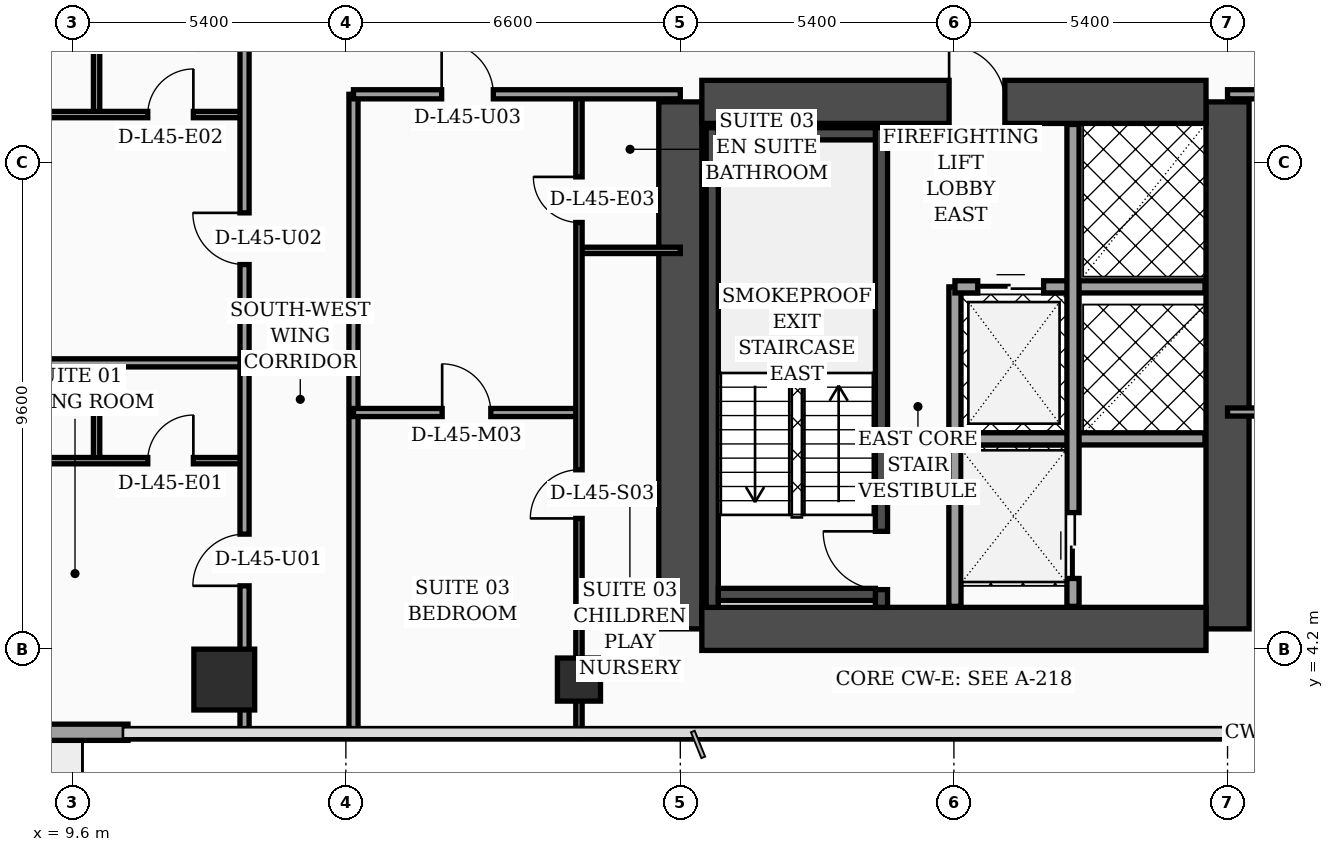
"""IFC4 building model, lengths in metres.
Left out: names, types, materials, properties, quantities, classifications, styles, units other than length and angle.
Written with IfcOpenShell. Run it as: python <this file> out.ifc"""

import sys

from ifc_helpers import new_model, si_unit, direction, frame, frame_2d, origin, origin_2d, place, context, subcontext, project, spatial, rectangle, hollow_rectangle, extrude, element, fill, save


model = new_model("IFC4")
c1 = context("Model", 3, precision=1e-05, world=origin(), true_north=direction((0.0, 1.0)))
c2 = subcontext(c1, "Body", "Model", "MODEL_VIEW")
j1 = project(units=[si_unit("LENGTHUNIT", "METRE"), si_unit("PLANEANGLEUNIT", "RADIAN")], contexts=[c1])
p1 = place(None, origin())
s1 = spatial("IfcSite", under=j1, at=p1, CompositionType="ELEMENT")
p2 = place(p1, origin())
s2 = spatial("IfcBuilding", under=s1, at=p2, CompositionType="ELEMENT")
p3 = place(p2, frame((0.0, 0.0, 182.7)))
s3 = spatial("IfcBuildingStorey", under=s2, at=p3, CompositionType="ELEMENT", Elevation=182.7)
for number, where, z_axis, x_axis in (
    (1, (21.6, 4.6, 0.0), (0.0, 0.0, 1.0), (0.0, 1.0, 0.0)),
    (2, (32.4, 4.6, 0.0), (0.0, 0.0, 1.0), (0.0, 1.0, 0.0)),
):
    element("IfcWall", number, at=place(p3, frame(where, z_axis=z_axis, x_axis=x_axis)), inside=s3, PredefinedType="SHEAR", context=c2, shape_type="SweptSolid", body=[
        extrude(rectangle(XDim=10.4, YDim=0.85, at=frame_2d((5.2, 0.0))), origin(), (0.0, 0.0, 1.0), 3.52),
    ])
p4 = place(p3, frame((22.025, 15.0, 0.0), z_axis=(0.0, 0.0, 1.0), x_axis=(1.0, 0.0, 0.0)))
e3 = element("IfcWall", 3, at=p4, inside=s3, PredefinedType="SHEAR", context=c2, shape_type="SweptSolid", body=[
    extrude(rectangle(XDim=9.95, YDim=0.85, at=frame_2d((4.975, 0.0))), origin(), (0.0, 0.0, 1.0), 3.52),
])
p5 = place(p4, frame((4.88, 0.0, 0.0)))
e4 = element("IfcOpeningElement", 4, at=p5, cuts=e3, PredefinedType="OPENING", context=c2, shape_type="SweptSolid", body=[
    extrude(rectangle(XDim=1.1, YDim=2.2, at=frame_2d((0.55, 1.1))), frame((0.0, 0.435, 0.0), z_axis=(0.0, -1.0, 0.0), x_axis=(1.0, 0.0, 0.0)), (0.0, 0.0, 1.0), 0.87),
])
p6 = place(p3, frame((22.025, 4.6, 0.0), z_axis=(0.0, 0.0, 1.0), x_axis=(1.0, 0.0, 0.0)))
e5 = element("IfcWall", 5, at=p6, inside=s3, PredefinedType="SHEAR", context=c2, shape_type="SweptSolid", body=[
    extrude(rectangle(XDim=9.95, YDim=0.85, at=frame_2d((4.975, 0.0))), origin(), (0.0, 0.0, 1.0), 3.52),
])
p7 = place(p3, frame((22.23, 5.025, 0.0), z_axis=(0.0, 0.0, 1.0), x_axis=(0.0, 1.0, 0.0)))
e6 = element("IfcWall", 6, at=p7, inside=s3, PredefinedType="SOLIDWALL", context=c2, shape_type="SweptSolid", body=[
    extrude(rectangle(XDim=9.465, YDim=0.24, at=frame_2d((4.732, 0.0))), origin(), (0.0, 0.0, 1.0), 3.52),
])
p8 = place(p3, frame((25.57, 5.025, 0.0), z_axis=(0.0, 0.0, 1.0), x_axis=(0.0, 1.0, 0.0)))
e7 = element("IfcWall", 7, at=p8, inside=s3, PredefinedType="SOLIDWALL", context=c2, shape_type="SweptSolid", body=[
    extrude(rectangle(XDim=9.465, YDim=0.24, at=frame_2d((4.732, 0.0))), origin(), (0.0, 0.0, 1.0), 3.52),
])
p9 = place(p8, frame((0.35, 0.0, 0.0)))
e8 = element("IfcOpeningElement", 8, at=p9, cuts=e7, PredefinedType="OPENING", context=c2, shape_type="SweptSolid", body=[
    extrude(rectangle(XDim=1.15, YDim=2.2, at=frame_2d((0.575, 1.1))), frame((0.0, 0.13, 0.0), z_axis=(0.0, -1.0, 0.0), x_axis=(1.0, 0.0, 0.0)), (0.0, 0.0, 1.0), 0.26),
])
for number, where, z_axis, x_axis in (
    (9, (22.35, 5.28, 0.0), (0.0, 0.0, 1.0), (1.0, 0.0, 0.0)),
    (10, (22.35, 14.37, 0.0), (0.0, 0.0, 1.0), (1.0, 0.0, 0.0)),
):
    element("IfcWall", number, at=place(p3, frame(where, z_axis=z_axis, x_axis=x_axis)), inside=s3, PredefinedType="SOLIDWALL", context=c2, shape_type="SweptSolid", body=[
        extrude(rectangle(XDim=3.1, YDim=0.24, at=frame_2d((1.55, 0.0))), origin(), (0.0, 0.0, 1.0), 3.52),
    ])
p10 = place(p3, frame((12.6, 3.6, 0.0), z_axis=(0.0, 0.0, 1.0), x_axis=(1.0, 0.0, 0.0)))
e11 = element("IfcColumn", 11, at=p10, inside=s3, PredefinedType="COLUMN", context=c2, shape_type="SweptSolid", body=[
    extrude(rectangle(XDim=1.2, YDim=1.2, at=origin_2d()), origin(), (0.0, 0.0, 1.0), 3.52),
])
p11 = place(p3, frame((19.6, 3.6, 0.0), z_axis=(0.0, 0.0, 1.0), x_axis=(1.0, 0.0, 0.0)))
e12 = element("IfcColumn", 12, at=p11, inside=s3, PredefinedType="COLUMN", context=c2, shape_type="SweptSolid", body=[
    extrude(hollow_rectangle(XDim=0.85, YDim=0.85, WallThickness=0.036, at=origin_2d()), origin(), (0.0, 0.0, 1.0), 3.52),
])
p12 = place(p3, frame((3.1, 2.56, 0.0), z_axis=(0.0, 0.0, 1.0), x_axis=(1.0, 0.0, 0.0)))
e13 = element("IfcWall", 13, at=p12, inside=s3, PredefinedType="SOLIDWALL", context=c2, shape_type="SweptSolid", body=[
    extrude(rectangle(XDim=7.6, YDim=0.32, at=frame_2d((3.8, 0.0))), origin(), (0.0, 0.0, 1.0), 3.52),
])
p13 = place(p12, frame((0.45, 0.0, 0.75)))
e14 = element("IfcOpeningElement", 14, at=p13, cuts=e13, PredefinedType="OPENING", context=c2, shape_type="SweptSolid", body=[
    extrude(rectangle(XDim=1.0, YDim=1.6, at=frame_2d((0.5, 0.8))), frame((0.0, 0.17, 0.0), z_axis=(0.0, -1.0, 0.0), x_axis=(1.0, 0.0, 0.0)), (0.0, 0.0, 1.0), 0.34),
])
p14 = place(p12, frame((3.8, 0.0, 0.0)))
e15 = element("IfcOpeningElement", 15, at=p14, cuts=e13, PredefinedType="OPENING", context=c2, shape_type="SweptSolid", body=[
    extrude(rectangle(XDim=1.4, YDim=2.25, at=frame_2d((0.7, 1.125))), frame((0.0, 0.17, 0.0), z_axis=(0.0, -1.0, 0.0), x_axis=(1.0, 0.0, 0.0)), (0.0, 0.0, 1.0), 0.34),
])
p15 = place(p3, frame((27.02, 5.045, 0.0), z_axis=(0.0, 0.0, 1.0), x_axis=(0.0, 1.0, 0.0)))
e16 = element("IfcWall", 16, at=p15, inside=s3, PredefinedType="SOLIDWALL", context=c2, shape_type="SweptSolid", body=[
    extrude(rectangle(XDim=6.305, YDim=0.24, at=frame_2d((3.153, 0.0))), origin(), (0.0, 0.0, 1.0), 3.52),
])
p16 = place(p3, frame((27.02, 11.35, 0.0), z_axis=(0.0, 0.0, 1.0), x_axis=(1.0, 0.0, 0.0)))
e17 = element("IfcWall", 17, at=p16, inside=s3, PredefinedType="SOLIDWALL", context=c2, shape_type="SweptSolid", body=[
    extrude(rectangle(XDim=4.935, YDim=0.24, at=frame_2d((2.468, 0.0))), origin(), (0.0, 0.0, 1.0), 3.52),
])
p17 = place(p16, frame((0.45, 0.0, 0.0)))
e18 = element("IfcOpeningElement", 18, at=p17, cuts=e17, PredefinedType="OPENING", context=c2, shape_type="SweptSolid", body=[
    extrude(rectangle(XDim=1.3, YDim=2.35, at=frame_2d((0.65, 1.175))), frame((0.0, 0.13, 0.0), z_axis=(0.0, -1.0, 0.0), x_axis=(1.0, 0.0, 0.0)), (0.0, 0.0, 1.0), 0.26),
])
p18 = place(p3, frame((27.02, 8.35, 0.0), z_axis=(0.0, 0.0, 1.0), x_axis=(1.0, 0.0, 0.0)))
e19 = element("IfcWall", 19, at=p18, inside=s3, PredefinedType="SOLIDWALL", context=c2, shape_type="SweptSolid", body=[
    extrude(rectangle(XDim=4.935, YDim=0.24, at=frame_2d((2.468, 0.0))), origin(), (0.0, 0.0, 1.0), 3.52),
])
p19 = place(p3, frame((29.35, 5.045, 0.0), z_axis=(0.0, 0.0, 1.0), x_axis=(0.0, 1.0, 0.0)))
e20 = element("IfcWall", 20, at=p19, inside=s3, PredefinedType="SOLIDWALL", context=c2, shape_type="SweptSolid", body=[
    extrude(rectangle(XDim=9.51, YDim=0.24, at=frame_2d((4.755, 0.0))), origin(), (0.0, 0.0, 1.0), 3.52),
])
p20 = place(p19, frame((0.55, 0.0, 0.0)))
e21 = element("IfcOpeningElement", 21, at=p20, cuts=e20, PredefinedType="OPENING", context=c2, shape_type="SweptSolid", body=[
    extrude(rectangle(XDim=1.3, YDim=2.35, at=frame_2d((0.65, 1.175))), frame((0.0, 0.13, 0.0), z_axis=(0.0, -1.0, 0.0), x_axis=(1.0, 0.0, 0.0)), (0.0, 0.0, 1.0), 0.26),
])
p21 = place(p3, frame((10.08, 7.92, 0.0), z_axis=(0.0, 0.0, 1.0), x_axis=(0.0, 1.0, 0.0)))
e22 = element("IfcWall", 22, at=p21, inside=s3, PredefinedType="PARTITIONING", context=c2, shape_type="SweptSolid", body=[
    extrude(rectangle(XDim=1.93, YDim=0.125, at=frame_2d((0.965, 0.0))), origin(), (0.0, 0.0, 1.0), 3.52),
])
p22 = place(p3, frame((3.2, 7.92, 0.0), z_axis=(0.0, 0.0, 1.0), x_axis=(1.0, 0.0, 0.0)))
e23 = element("IfcWall", 23, at=p22, inside=s3, PredefinedType="PARTITIONING", context=c2, shape_type="SweptSolid", body=[
    extrude(rectangle(XDim=9.8, YDim=0.125, at=frame_2d((4.9, 0.0))), origin(), (0.0, 0.0, 1.0), 2.92),
])
p23 = place(p22, frame((3.32, 0.0, 0.0)))
e24 = element("IfcOpeningElement", 24, at=p23, cuts=e23, PredefinedType="OPENING", context=c2, shape_type="SweptSolid", body=[
    extrude(rectangle(XDim=0.96, YDim=2.2, at=frame_2d((0.48, 1.1))), frame((0.0, 0.073, 0.0), z_axis=(0.0, -1.0, 0.0), x_axis=(1.0, 0.0, 0.0)), (0.0, 0.0, 1.0), 0.145),
])
p24 = place(p22, frame((7.89, 0.0, 0.0)))
e25 = element("IfcOpeningElement", 25, at=p24, cuts=e23, PredefinedType="OPENING", context=c2, shape_type="SweptSolid", body=[
    extrude(rectangle(XDim=0.9, YDim=2.15, at=frame_2d((0.45, 1.075))), frame((0.0, 0.073, 0.0), z_axis=(0.0, -1.0, 0.0), x_axis=(1.0, 0.0, 0.0)), (0.0, 0.0, 1.0), 0.145),
])
p25 = place(p3, frame((10.08, 14.75, 0.0), z_axis=(0.0, 0.0, 1.0), x_axis=(0.0, 1.0, 0.0)))
e26 = element("IfcWall", 26, at=p25, inside=s3, PredefinedType="PARTITIONING", context=c2, shape_type="SweptSolid", body=[
    extrude(rectangle(XDim=2.05, YDim=0.125, at=frame_2d((1.025, 0.0))), origin(), (0.0, 0.0, 1.0), 3.52),
])
p26 = place(p3, frame((0.08, 14.75, 0.0), z_axis=(0.0, 0.0, 1.0), x_axis=(1.0, 0.0, 0.0)))
e27 = element("IfcWall", 27, at=p26, inside=s3, PredefinedType="PARTITIONING", context=c2, shape_type="SweptSolid", body=[
    extrude(rectangle(XDim=12.92, YDim=0.125, at=frame_2d((6.46, 0.0))), origin(), (0.0, 0.0, 1.0), 2.92),
])
p27 = place(p26, frame((4.52, 0.0, 0.0)))
e28 = element("IfcOpeningElement", 28, at=p27, cuts=e27, PredefinedType="OPENING", context=c2, shape_type="SweptSolid", body=[
    extrude(rectangle(XDim=0.96, YDim=2.2, at=frame_2d((0.48, 1.1))), frame((0.0, 0.073, 0.0), z_axis=(0.0, -1.0, 0.0), x_axis=(1.0, 0.0, 0.0)), (0.0, 0.0, 1.0), 0.145),
])
p28 = place(p26, frame((11.01, 0.0, 0.0)))
e29 = element("IfcOpeningElement", 29, at=p28, cuts=e27, PredefinedType="OPENING", context=c2, shape_type="SweptSolid", body=[
    extrude(rectangle(XDim=0.9, YDim=2.15, at=frame_2d((0.45, 1.075))), frame((0.0, 0.073, 0.0), z_axis=(0.0, -1.0, 0.0), x_axis=(1.0, 0.0, 0.0)), (0.0, 0.0, 1.0), 0.145),
])
p29 = place(p3, frame((0.08, 9.85, 0.0), z_axis=(0.0, 0.0, 1.0), x_axis=(1.0, 0.0, 0.0)))
e30 = element("IfcWall", 30, at=p29, inside=s3, PredefinedType="PARTITIONING", context=c2, shape_type="SweptSolid", body=[
    extrude(rectangle(XDim=12.92, YDim=0.16, at=frame_2d((6.46, 0.0))), origin(), (0.0, 0.0, 1.0), 2.92),
])
p30 = place(p3, frame((13.0, 2.44, 0.0), z_axis=(0.0, 0.0, 1.0), x_axis=(0.0, 1.0, 0.0)))
e31 = element("IfcWall", 31, at=p30, inside=s3, PredefinedType="PARTITIONING", context=c2, shape_type="SweptSolid", body=[
    extrude(rectangle(XDim=14.36, YDim=0.18, at=frame_2d((7.18, 0.0))), origin(), (0.0, 0.0, 1.0), 2.92),
])
p31 = place(p30, frame((3.01, 0.0, 0.0)))
e32 = element("IfcOpeningElement", 32, at=p31, cuts=e31, PredefinedType="OPENING", context=c2, shape_type="SweptSolid", body=[
    extrude(rectangle(XDim=1.02, YDim=2.2, at=frame_2d((0.51, 1.1))), frame((0.0, 0.1, 0.0), z_axis=(0.0, -1.0, 0.0), x_axis=(1.0, 0.0, 0.0)), (0.0, 0.0, 1.0), 0.2),
])
p32 = place(p30, frame((9.35, 0.0, 0.0)))
e33 = element("IfcOpeningElement", 33, at=p32, cuts=e31, PredefinedType="OPENING", context=c2, shape_type="SweptSolid", body=[
    extrude(rectangle(XDim=1.02, YDim=2.2, at=frame_2d((0.51, 1.1))), frame((0.0, 0.1, 0.0), z_axis=(0.0, -1.0, 0.0), x_axis=(1.0, 0.0, 0.0)), (0.0, 0.0, 1.0), 0.2),
])
p33 = place(p3, frame((15.15, 2.44, 0.0), z_axis=(0.0, 0.0, 1.0), x_axis=(0.0, 1.0, 0.0)))
e34 = element("IfcWall", 34, at=p33, inside=s3, PredefinedType="PARTITIONING", context=c2, shape_type="SweptSolid", body=[
    extrude(rectangle(XDim=12.71, YDim=0.18, at=frame_2d((6.355, 0.0))), origin(), (0.0, 0.0, 1.0), 3.02),
])
p34 = place(p3, frame((19.6, 12.07, 0.0), z_axis=(0.0, 0.0, 1.0), x_axis=(1.0, 0.0, 0.0)))
e35 = element("IfcWall", 35, at=p34, inside=s3, PredefinedType="PARTITIONING", context=c2, shape_type="SweptSolid", body=[
    extrude(rectangle(XDim=2.0, YDim=0.125, at=frame_2d((1.0, 0.0))), origin(), (0.0, 0.0, 1.0), 3.52),
])
p35 = place(p3, frame((15.15, 8.87, 0.0), z_axis=(0.0, 0.0, 1.0), x_axis=(1.0, 0.0, 0.0)))
e36 = element("IfcWall", 36, at=p35, inside=s3, PredefinedType="PARTITIONING", context=c2, shape_type="SweptSolid", body=[
    extrude(rectangle(XDim=4.45, YDim=0.16, at=frame_2d((2.225, 0.0))), origin(), (0.0, 0.0, 1.0), 3.52),
])
p36 = place(p35, frame((1.75, 0.0, 0.0)))
e37 = element("IfcOpeningElement", 37, at=p36, cuts=e36, PredefinedType="OPENING", context=c2, shape_type="SweptSolid", body=[
    extrude(rectangle(XDim=0.96, YDim=2.2, at=frame_2d((0.48, 1.1))), frame((0.0, 0.09, 0.0), z_axis=(0.0, -1.0, 0.0), x_axis=(1.0, 0.0, 0.0)), (0.0, 0.0, 1.0), 0.18),
])
p37 = place(p3, frame((19.6, 2.44, 0.0), z_axis=(0.0, 0.0, 1.0), x_axis=(0.0, 1.0, 0.0)))
e38 = element("IfcWall", 38, at=p37, inside=s3, PredefinedType="PARTITIONING", context=c2, shape_type="SweptSolid", body=[
    extrude(rectangle(XDim=12.71, YDim=0.125, at=frame_2d((6.355, 0.0))), origin(), (0.0, 0.0, 1.0), 2.47),
])
p38 = place(p37, frame((4.34, 0.0, 0.0)))
e39 = element("IfcOpeningElement", 39, at=p38, cuts=e38, PredefinedType="OPENING", context=c2, shape_type="SweptSolid", body=[
    extrude(rectangle(XDim=0.96, YDim=2.2, at=frame_2d((0.48, 1.1))), frame((0.0, 0.073, 0.0), z_axis=(0.0, -1.0, 0.0), x_axis=(1.0, 0.0, 0.0)), (0.0, 0.0, 1.0), 0.145),
])
p39 = place(p37, frame((10.18, 0.0, 0.0)))
e40 = element("IfcOpeningElement", 40, at=p39, cuts=e38, PredefinedType="OPENING", context=c2, shape_type="SweptSolid", body=[
    extrude(rectangle(XDim=0.9, YDim=2.15, at=frame_2d((0.45, 1.075))), frame((0.0, 0.073, 0.0), z_axis=(0.0, -1.0, 0.0), x_axis=(1.0, 0.0, 0.0)), (0.0, 0.0, 1.0), 0.145),
])
p40 = place(p3, frame((15.15, 15.15, 0.0), z_axis=(0.0, 0.0, 1.0), x_axis=(1.0, 0.0, 0.0)))
e41 = element("IfcWall", 41, at=p40, inside=s3, PredefinedType="PARTITIONING", context=c2, shape_type="SweptSolid", body=[
    extrude(rectangle(XDim=6.45, YDim=0.18, at=frame_2d((3.225, 0.0))), origin(), (0.0, 0.0, 1.0), 2.47),
])
p41 = place(p40, frame((1.74, 0.0, 0.0)))
e42 = element("IfcOpeningElement", 42, at=p41, cuts=e41, PredefinedType="OPENING", context=c2, shape_type="SweptSolid", body=[
    extrude(rectangle(XDim=1.02, YDim=2.2, at=frame_2d((0.51, 1.1))), frame((0.0, 0.1, 0.0), z_axis=(0.0, -1.0, 0.0), x_axis=(1.0, 0.0, 0.0)), (0.0, 0.0, 1.0), 0.2),
])
p42 = place(p3, frame((32.4, 8.88, 0.0), z_axis=(0.0, 0.0, 1.0), x_axis=(1.0, 0.0, 0.0)))
e43 = element("IfcWall", 43, at=p42, inside=s3, PredefinedType="PARTITIONING", context=c2, shape_type="SweptSolid", body=[
    extrude(rectangle(XDim=5.2, YDim=0.16, at=frame_2d((2.6, 0.0))), origin(), (0.0, 0.0, 1.0), 2.92),
])
p43 = place(p42, frame((2.12, 0.0, 0.0)))
e44 = element("IfcOpeningElement", 44, at=p43, cuts=e43, PredefinedType="OPENING", context=c2, shape_type="SweptSolid", body=[
    extrude(rectangle(XDim=0.96, YDim=2.2, at=frame_2d((0.48, 1.1))), frame((0.0, 0.09, 0.0), z_axis=(0.0, -1.0, 0.0), x_axis=(1.0, 0.0, 0.0)), (0.0, 0.0, 1.0), 0.18),
])
p44 = place(p3, frame((32.4, 15.15, 0.0), z_axis=(0.0, 0.0, 1.0), x_axis=(1.0, 0.0, 0.0)))
e45 = element("IfcWall", 45, at=p44, inside=s3, PredefinedType="PARTITIONING", context=c2, shape_type="SweptSolid", body=[
    extrude(rectangle(XDim=7.2, YDim=0.18, at=frame_2d((3.6, 0.0))), origin(), (0.0, 0.0, 1.0), 2.92),
])
p45 = place(p44, frame((2.19, 0.0, 0.0)))
e46 = element("IfcOpeningElement", 46, at=p45, cuts=e45, PredefinedType="OPENING", context=c2, shape_type="SweptSolid", body=[
    extrude(rectangle(XDim=1.02, YDim=2.2, at=frame_2d((0.51, 1.1))), frame((0.0, 0.1, 0.0), z_axis=(0.0, -1.0, 0.0), x_axis=(1.0, 0.0, 0.0)), (0.0, 0.0, 1.0), 0.2),
])
p46 = place(p17, origin())
e47 = element("IfcDoor", 47, at=p46, inside=s3, OperationType="DOUBLE_DOOR_SLIDING", PredefinedType="DOOR", context=c2, shape_type="SweptSolid", body=[
    extrude(rectangle(XDim=1.3, YDim=2.35, at=frame_2d((0.65, 1.175))), frame((0.0, 0.025, 0.0), z_axis=(0.0, -1.0, 0.0), x_axis=(1.0, 0.0, 0.0)), (0.0, 0.0, 1.0), 0.05),
])
fill(e18, e47)
p47 = place(p20, origin())
e48 = element("IfcDoor", 48, at=p47, inside=s3, OperationType="DOUBLE_DOOR_SLIDING", PredefinedType="DOOR", context=c2, shape_type="SweptSolid", body=[
    extrude(rectangle(XDim=1.3, YDim=2.35, at=frame_2d((0.65, 1.175))), frame((0.0, 0.025, 0.0), z_axis=(0.0, -1.0, 0.0), x_axis=(1.0, 0.0, 0.0)), (0.0, 0.0, 1.0), 0.05),
])
fill(e21, e48)
p48 = place(p24, origin())
e49 = element("IfcDoor", 49, at=p48, inside=s3, OperationType="SINGLE_SWING_RIGHT", PredefinedType="DOOR", context=c2, shape_type="SweptSolid", body=[
    extrude(rectangle(XDim=0.9, YDim=2.15, at=frame_2d((0.45, 1.075))), frame((0.0, 0.025, 0.0), z_axis=(0.0, -1.0, 0.0), x_axis=(1.0, 0.0, 0.0)), (0.0, 0.0, 1.0), 0.05),
])
fill(e25, e49)
p49 = place(p28, origin())
e50 = element("IfcDoor", 50, at=p49, inside=s3, OperationType="SINGLE_SWING_RIGHT", PredefinedType="DOOR", context=c2, shape_type="SweptSolid", body=[
    extrude(rectangle(XDim=0.9, YDim=2.15, at=frame_2d((0.45, 1.075))), frame((0.0, 0.025, 0.0), z_axis=(0.0, -1.0, 0.0), x_axis=(1.0, 0.0, 0.0)), (0.0, 0.0, 1.0), 0.05),
])
fill(e29, e50)
p50 = place(p31, origin())
e51 = element("IfcDoor", 51, at=p50, inside=s3, OperationType="SINGLE_SWING_LEFT", PredefinedType="DOOR", context=c2, shape_type="SweptSolid", body=[
    extrude(rectangle(XDim=1.02, YDim=2.2, at=frame_2d((0.51, 1.1))), frame((0.0, 0.025, 0.0), z_axis=(0.0, -1.0, 0.0), x_axis=(1.0, 0.0, 0.0)), (0.0, 0.0, 1.0), 0.05),
])
fill(e32, e51)
p51 = place(p32, origin())
e52 = element("IfcDoor", 52, at=p51, inside=s3, OperationType="SINGLE_SWING_RIGHT", PredefinedType="DOOR", context=c2, shape_type="SweptSolid", body=[
    extrude(rectangle(XDim=1.02, YDim=2.2, at=frame_2d((0.51, 1.1))), frame((0.0, 0.025, 0.0), z_axis=(0.0, -1.0, 0.0), x_axis=(1.0, 0.0, 0.0)), (0.0, 0.0, 1.0), 0.05),
])
fill(e33, e52)
p52 = place(p36, origin())
e53 = element("IfcDoor", 53, at=p52, inside=s3, OperationType="SINGLE_SWING_LEFT", PredefinedType="DOOR", context=c2, shape_type="SweptSolid", body=[
    extrude(rectangle(XDim=0.96, YDim=2.2, at=frame_2d((0.48, 1.1))), frame((0.0, 0.025, 0.0), z_axis=(0.0, -1.0, 0.0), x_axis=(1.0, 0.0, 0.0)), (0.0, 0.0, 1.0), 0.05),
])
fill(e37, e53)
p53 = place(p38, origin())
e54 = element("IfcDoor", 54, at=p53, inside=s3, OperationType="SINGLE_SWING_LEFT", PredefinedType="DOOR", context=c2, shape_type="SweptSolid", body=[
    extrude(rectangle(XDim=0.96, YDim=2.2, at=frame_2d((0.48, 1.1))), frame((0.0, 0.025, 0.0), z_axis=(0.0, -1.0, 0.0), x_axis=(1.0, 0.0, 0.0)), (0.0, 0.0, 1.0), 0.05),
])
fill(e39, e54)
p54 = place(p39, origin())
e55 = element("IfcDoor", 55, at=p54, inside=s3, OperationType="SINGLE_SWING_RIGHT", PredefinedType="DOOR", context=c2, shape_type="SweptSolid", body=[
    extrude(rectangle(XDim=0.9, YDim=2.15, at=frame_2d((0.45, 1.075))), frame((0.0, 0.025, 0.0), z_axis=(0.0, -1.0, 0.0), x_axis=(1.0, 0.0, 0.0)), (0.0, 0.0, 1.0), 0.05),
])
fill(e40, e55)
p55 = place(p41, origin())
e56 = element("IfcDoor", 56, at=p55, inside=s3, OperationType="SINGLE_SWING_LEFT", PredefinedType="DOOR", context=c2, shape_type="SweptSolid", body=[
    extrude(rectangle(XDim=1.02, YDim=2.2, at=frame_2d((0.51, 1.1))), frame((0.0, 0.025, 0.0), z_axis=(0.0, -1.0, 0.0), x_axis=(1.0, 0.0, 0.0)), (0.0, 0.0, 1.0), 0.05),
])
fill(e42, e56)
p56 = place(p9, origin())
e57 = element("IfcDoor", 57, at=p56, inside=s3, OperationType="SINGLE_SWING_RIGHT", PredefinedType="DOOR", context=c2, shape_type="SweptSolid", body=[
    extrude(rectangle(XDim=1.15, YDim=2.2, at=frame_2d((0.575, 1.1))), frame((0.0, 0.025, 0.0), z_axis=(0.0, -1.0, 0.0), x_axis=(1.0, 0.0, 0.0)), (0.0, 0.0, 1.0), 0.05),
])
fill(e8, e57)
p57 = place(p5, origin())
e58 = element("IfcDoor", 58, at=p57, inside=s3, OperationType="SINGLE_SWING_LEFT", PredefinedType="DOOR", context=c2, shape_type="SweptSolid", body=[
    extrude(rectangle(XDim=1.1, YDim=2.2, at=frame_2d((0.55, 1.1))), frame((0.0, 0.025, 0.0), z_axis=(0.0, -1.0, 0.0), x_axis=(1.0, 0.0, 0.0)), (0.0, 0.0, 1.0), 0.05),
])
fill(e4, e58)
save(model, sys.argv[1])
